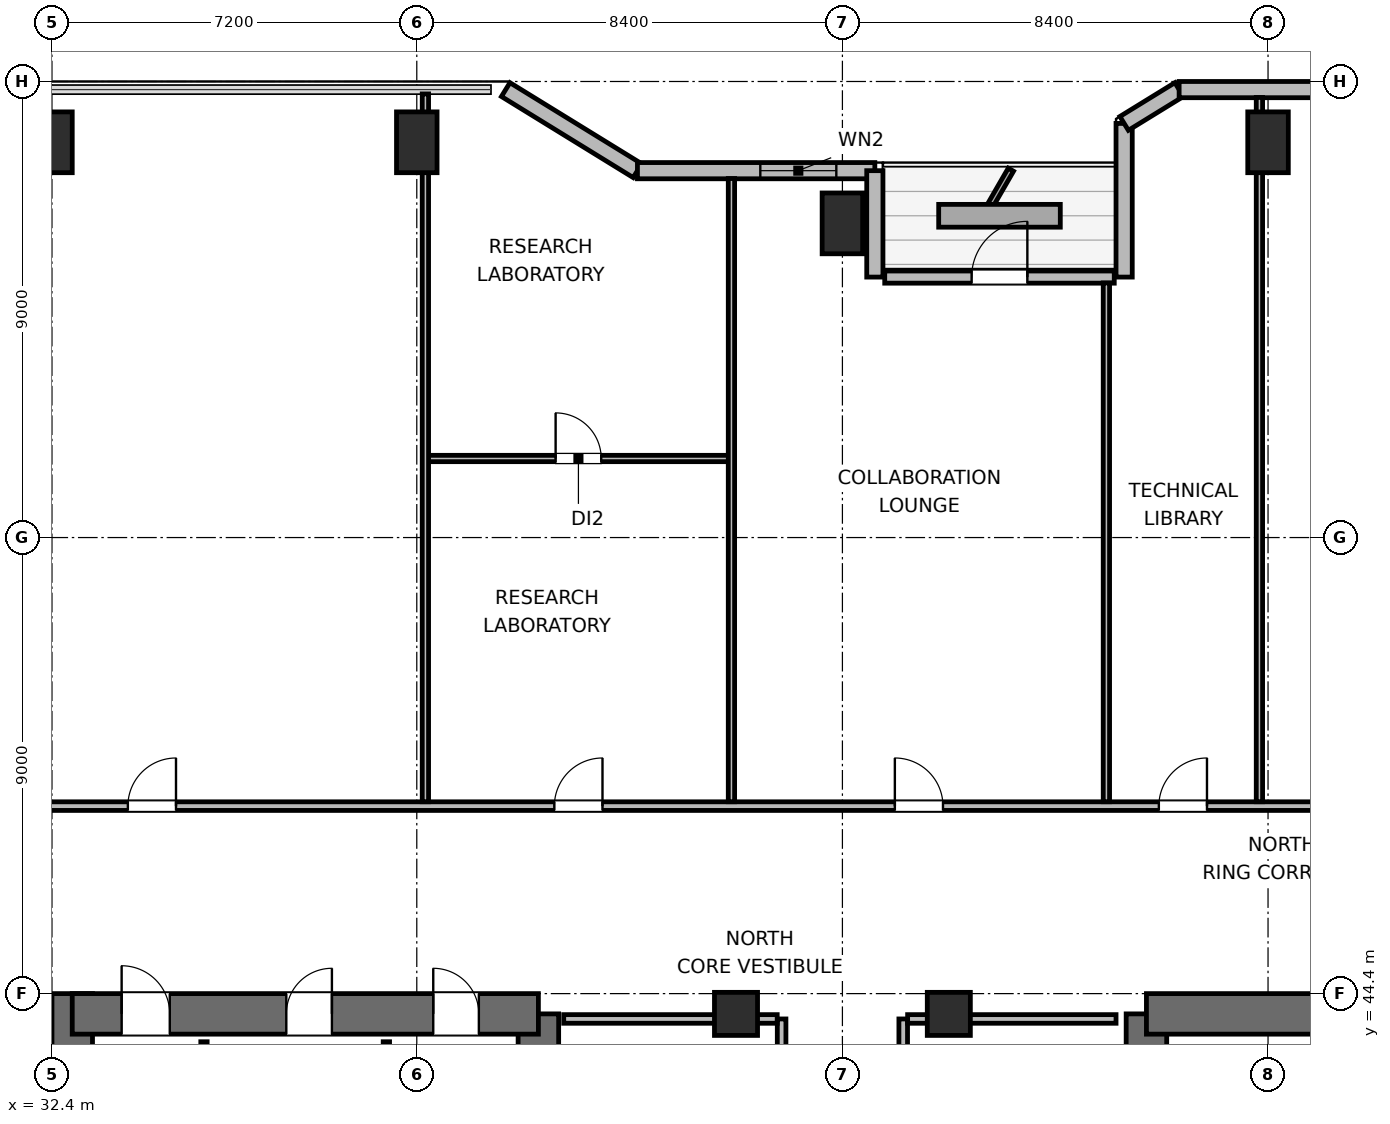
"""IFC4 building model, lengths in metres.
Left out: names, types, materials, properties, quantities, classifications, styles, units other than length and angle.
Written with IfcOpenShell. Run it as: python <this file> out.ifc"""

import sys

from ifc_helpers import new_model, si_unit, direction, frame, frame_2d, origin, origin_2d, place, context, subcontext, project, spatial, rectangle, extrude, element, fill, save


model = new_model("IFC4")
c1 = context("Model", 3, precision=1e-05, world=origin(), true_north=direction((0.0, 1.0)))
c2 = subcontext(c1, "Body", "Model", "MODEL_VIEW")
j1 = project(units=[si_unit("LENGTHUNIT", "METRE"), si_unit("PLANEANGLEUNIT", "RADIAN")], contexts=[c1])
p1 = place(None, origin())
s1 = spatial("IfcSite", under=j1, at=p1, CompositionType="ELEMENT")
p2 = place(p1, origin())
s2 = spatial("IfcBuilding", under=s1, at=p2, CompositionType="ELEMENT")
p3 = place(p2, frame((0.0, 0.0, 105.3)))
s3 = spatial("IfcBuildingStorey", under=s2, at=p3, CompositionType="ELEMENT", Elevation=105.3)
p4 = place(p3, frame((32.8, 27.6, 0.0), z_axis=(0.0, 0.0, 1.0), x_axis=(0.0, 1.0, 0.0)))
e1 = element("IfcWall", 1, at=p4, inside=s3, PredefinedType="SHEAR", context=c2, shape_type="SweptSolid", body=[
    extrude(rectangle(XDim=16.8, YDim=0.8, at=frame_2d((8.4, 0.0))), origin(), (0.0, 0.0, 1.0), 3.9),
])
p5 = place(p3, frame((42.0, 37.8, 0.0), z_axis=(0.0, 0.0, 1.0), x_axis=(0.0, 1.0, 0.0)))
e2 = element("IfcWall", 2, at=p5, inside=s3, PredefinedType="SHEAR", context=c2, shape_type="SweptSolid", body=[
    extrude(rectangle(XDim=6.2, YDim=0.8, at=frame_2d((3.1, 0.0))), origin(), (0.0, 0.0, 1.0), 3.9),
])
p6 = place(p3, frame((32.8, 44.0, 0.0), z_axis=(0.0, 0.0, 1.0), x_axis=(1.0, 0.0, 0.0)))
e3 = element("IfcWall", 3, at=p6, inside=s3, PredefinedType="SHEAR", context=c2, shape_type="SweptSolid", body=[
    extrude(rectangle(XDim=9.2, YDim=0.8, at=frame_2d((4.6, 0.0))), origin(), (0.0, 0.0, 1.0), 3.9),
])
p7 = place(p6, frame((0.975, 0.0, 0.0)))
e4 = element("IfcOpeningElement", 4, at=p7, cuts=e3, PredefinedType="OPENING", context=c2, shape_type="SweptSolid", body=[
    extrude(rectangle(XDim=0.95, YDim=2.04, at=frame_2d((0.475, 1.02))), frame((0.0, 0.41, 0.0), z_axis=(0.0, -1.0, 0.0), x_axis=(1.0, 0.0, 0.0)), (0.0, 0.0, 1.0), 0.82),
])
p8 = place(p6, frame((4.225, 0.0, 0.0)))
e5 = element("IfcOpeningElement", 5, at=p8, cuts=e3, PredefinedType="OPENING", context=c2, shape_type="SweptSolid", body=[
    extrude(rectangle(XDim=0.9, YDim=2.02, at=frame_2d((0.45, 1.01))), frame((0.0, 0.41, 0.0), z_axis=(0.0, -1.0, 0.0), x_axis=(1.0, 0.0, 0.0)), (0.0, 0.0, 1.0), 0.82),
])
p9 = place(p6, frame((7.125, 0.0, 0.0)))
e6 = element("IfcOpeningElement", 6, at=p9, cuts=e3, PredefinedType="OPENING", context=c2, shape_type="SweptSolid", body=[
    extrude(rectangle(XDim=0.9, YDim=2.02, at=frame_2d((0.45, 1.01))), frame((0.0, 0.41, 0.0), z_axis=(0.0, -1.0, 0.0), x_axis=(1.0, 0.0, 0.0)), (0.0, 0.0, 1.0), 0.82),
])
p10 = place(p3, frame((54.0, 38.0, 0.0), z_axis=(0.0, 0.0, 1.0), x_axis=(0.0, 1.0, 0.0)))
e7 = element("IfcWall", 7, at=p10, inside=s3, PredefinedType="SHEAR", context=c2, shape_type="SweptSolid", body=[
    extrude(rectangle(XDim=6.0, YDim=0.8, at=frame_2d((3.0, 0.0))), origin(), (0.0, 0.0, 1.0), 3.9),
])
p11 = place(p3, frame((54.0, 44.0, 0.0), z_axis=(0.0, 0.0, 1.0), x_axis=(1.0, 0.0, 0.0)))
e8 = element("IfcWall", 8, at=p11, inside=s3, PredefinedType="SHEAR", context=c2, shape_type="SweptSolid", body=[
    extrude(rectangle(XDim=9.2, YDim=0.8, at=frame_2d((4.6, 0.0))), origin(), (0.0, 0.0, 1.0), 3.9),
])
for number, where, z_axis, x_axis in (
    (9, (32.4, 61.2, 0.0), (0.0, 0.0, 1.0), (1.0, 0.0, 0.0)),
    (10, (39.6, 61.2, 0.0), (0.0, 0.0, 1.0), (1.0, 0.0, 0.0)),
    (11, (48.0, 59.6, 0.0), (0.0, 0.0, 1.0), (1.0, 0.0, 0.0)),
    (12, (56.4, 61.2, 0.0), (0.0, 0.0, 1.0), (1.0, 0.0, 0.0)),
):
    element("IfcColumn", number, at=place(p3, frame(where, z_axis=z_axis, x_axis=x_axis)), inside=s3, PredefinedType="COLUMN", context=c2, shape_type="SweptSolid", body=[
        extrude(rectangle(XDim=0.8, YDim=1.2, at=origin_2d()), origin(), (0.0, 0.0, 1.0), 3.9),
    ])
for number, where, z_axis, x_axis in (
    (13, (45.9, 44.0, 0.0), (0.0, 0.0, 1.0), (1.0, 0.0, 0.0)),
    (14, (50.1, 44.0, 0.0), (0.0, 0.0, 1.0), (1.0, 0.0, 0.0)),
):
    element("IfcColumn", number, at=place(p3, frame(where, z_axis=z_axis, x_axis=x_axis)), inside=s3, PredefinedType="COLUMN", context=c2, shape_type="SweptSolid", body=[
        extrude(rectangle(XDim=0.85, YDim=0.85, at=origin_2d()), origin(), (0.0, 0.0, 1.0), 3.9),
    ])
p12 = place(p3, frame((41.355, 62.24, 0.0), z_axis=(0.0, 0.0, 1.0), x_axis=(0.851630857047, -0.524142044989, 0.0)))
e15 = element("IfcWall", 15, at=p12, inside=s3, PredefinedType="SOLIDWALL", context=c2, shape_type="SweptSolid", body=[
    extrude(rectangle(XDim=3.053, YDim=0.32, at=frame_2d((1.526, 0.0))), origin(), (0.0, 0.0, 1.0), 2.875),
])
p13 = place(p3, frame((43.955, 60.64, 0.0), z_axis=(0.0, 0.0, 1.0), x_axis=(1.0, 0.0, 0.0)))
e16 = element("IfcWall", 16, at=p13, inside=s3, PredefinedType="SOLIDWALL", context=c2, shape_type="SweptSolid", body=[
    extrude(rectangle(XDim=4.685, YDim=0.32, at=frame_2d((2.343, 0.0))), origin(), (0.0, 0.0, 1.0), 2.875),
])
p14 = place(p13, frame((2.425, 0.0, 0.85)))
e17 = element("IfcOpeningElement", 17, at=p14, cuts=e16, PredefinedType="OPENING", context=c2, shape_type="SweptSolid", body=[
    extrude(rectangle(XDim=1.5, YDim=1.1, at=frame_2d((0.75, 0.55))), frame((0.0, 0.17, 0.0), z_axis=(0.0, -1.0, 0.0), x_axis=(1.0, 0.0, 0.0)), (0.0, 0.0, 1.0), 0.34),
])
p15 = place(p3, frame((48.64, 60.64, 0.0), z_axis=(0.0, 0.0, 1.0), x_axis=(0.0, -1.0, 0.0)))
e18 = element("IfcWall", 18, at=p15, inside=s3, PredefinedType="SOLIDWALL", context=c2, shape_type="SweptSolid", body=[
    extrude(rectangle(XDim=2.1, YDim=0.32, at=frame_2d((1.05, 0.0))), origin(), (0.0, 0.0, 1.0), 2.875),
])
p16 = place(p3, frame((48.835, 58.54, 0.0), z_axis=(0.0, 0.0, 1.0), x_axis=(1.0, 0.0, 0.0)))
e19 = element("IfcWall", 19, at=p16, inside=s3, PredefinedType="SOLIDWALL", context=c2, shape_type="SweptSolid", body=[
    extrude(rectangle(XDim=4.53, YDim=0.24, at=frame_2d((2.265, 0.0))), origin(), (0.0, 0.0, 1.0), 3.64),
])
p17 = place(p16, frame((1.715, 0.0, 0.0)))
e20 = element("IfcOpeningElement", 20, at=p17, cuts=e19, PredefinedType="OPENING", context=c2, shape_type="SweptSolid", body=[
    extrude(rectangle(XDim=1.1, YDim=2.04, at=frame_2d((0.55, 1.02))), frame((0.0, 0.13, 0.0), z_axis=(0.0, -1.0, 0.0), x_axis=(1.0, 0.0, 0.0)), (0.0, 0.0, 1.0), 0.26),
])
p18 = place(p3, frame((53.56, 58.54, 0.0), z_axis=(0.0, 0.0, 1.0), x_axis=(0.0, 1.0, 0.0)))
e21 = element("IfcWall", 21, at=p18, inside=s3, PredefinedType="SOLIDWALL", context=c2, shape_type="SweptSolid", body=[
    extrude(rectangle(XDim=3.032, YDim=0.32, at=frame_2d((1.516, 0.0))), origin(), (0.0, 0.0, 1.0), 2.875),
])
p19 = place(p3, frame((53.56, 61.573, 0.0), z_axis=(0.0, 0.0, 1.0), x_axis=(0.851776724646, 0.523904964045, 0.0)))
e22 = element("IfcWall", 22, at=p19, inside=s3, PredefinedType="SOLIDWALL", context=c2, shape_type="SweptSolid", body=[
    extrude(rectangle(XDim=1.274, YDim=0.32, at=frame_2d((0.637, 0.0))), origin(), (0.0, 0.0, 1.0), 3.64),
])
p20 = place(p3, frame((54.645, 62.24, 0.0), z_axis=(0.0, 0.0, 1.0), x_axis=(1.0, 0.0, 0.0)))
e23 = element("IfcWall", 23, at=p20, inside=s3, PredefinedType="SOLIDWALL", context=c2, shape_type="SweptSolid", body=[
    extrude(rectangle(XDim=10.734, YDim=0.32, at=frame_2d((5.367, 0.0))), origin(), (0.0, 0.0, 1.0), 3.64),
])
for number, where, z_axis, x_axis in (
    (24, (35.4, 41.095, 0.0), (0.0, 0.0, 1.0), (0.0, 1.0, 0.0)),
    (25, (39.0, 41.095, 0.0), (0.0, 0.0, 1.0), (0.0, 1.0, 0.0)),
):
    element("IfcWall", number, at=place(p3, frame(where, z_axis=z_axis, x_axis=x_axis)), inside=s3, PredefinedType="PARTITIONING", context=c2, shape_type="SweptSolid", body=[
        extrude(rectangle(XDim=2.355, YDim=0.125, at=frame_2d((1.177, 0.0))), origin(), (0.0, 0.0, 1.0), 3.64),
    ])
p21 = place(p3, frame((46.8, 37.9, 0.0), z_axis=(0.0, 0.0, 1.0), x_axis=(0.0, 1.0, 0.0)))
e26 = element("IfcWall", 26, at=p21, inside=s3, PredefinedType="PARTITIONING", context=c2, shape_type="SweptSolid", body=[
    extrude(rectangle(XDim=6.0, YDim=0.17, at=frame_2d((3.0, 0.0))), origin(), (0.0, 0.0, 1.0), 3.64),
])
p22 = place(p21, frame((0.54, 0.0, 0.0)))
e27 = element("IfcOpeningElement", 27, at=p22, cuts=e26, PredefinedType="OPENING", context=c2, shape_type="SweptSolid", body=[
    extrude(rectangle(XDim=0.9, YDim=2.02, at=frame_2d((0.45, 1.01))), frame((0.0, 0.095, 0.0), z_axis=(0.0, -1.0, 0.0), x_axis=(1.0, 0.0, 0.0)), (0.0, 0.0, 1.0), 0.19),
])
p23 = place(p21, frame((2.55, 0.0, 0.0)))
e28 = element("IfcOpeningElement", 28, at=p23, cuts=e26, PredefinedType="OPENING", context=c2, shape_type="SweptSolid", body=[
    extrude(rectangle(XDim=0.9, YDim=2.02, at=frame_2d((0.45, 1.01))), frame((0.0, 0.095, 0.0), z_axis=(0.0, -1.0, 0.0), x_axis=(1.0, 0.0, 0.0)), (0.0, 0.0, 1.0), 0.19),
])
p24 = place(p21, frame((4.56, 0.0, 0.0)))
e29 = element("IfcOpeningElement", 29, at=p24, cuts=e26, PredefinedType="OPENING", context=c2, shape_type="SweptSolid", body=[
    extrude(rectangle(XDim=0.9, YDim=2.02, at=frame_2d((0.45, 1.01))), frame((0.0, 0.095, 0.0), z_axis=(0.0, -1.0, 0.0), x_axis=(1.0, 0.0, 0.0)), (0.0, 0.0, 1.0), 0.19),
])
p25 = place(p3, frame((42.5, 43.9, 0.0), z_axis=(0.0, 0.0, 1.0), x_axis=(1.0, 0.0, 0.0)))
e30 = element("IfcWall", 30, at=p25, inside=s3, PredefinedType="PARTITIONING", context=c2, shape_type="SweptSolid", body=[
    extrude(rectangle(XDim=4.213, YDim=0.17, at=frame_2d((2.106, 0.0))), origin(), (0.0, 0.0, 1.0), 2.525),
])
p26 = place(p3, frame((49.2, 37.9, 0.0), z_axis=(0.0, 0.0, 1.0), x_axis=(0.0, 1.0, 0.0)))
e31 = element("IfcWall", 31, at=p26, inside=s3, PredefinedType="PARTITIONING", context=c2, shape_type="SweptSolid", body=[
    extrude(rectangle(XDim=6.0, YDim=0.17, at=frame_2d((3.0, 0.0))), origin(), (0.0, 0.0, 1.0), 3.64),
])
p27 = place(p26, frame((0.69, 0.0, 0.0)))
e32 = element("IfcOpeningElement", 32, at=p27, cuts=e31, PredefinedType="OPENING", context=c2, shape_type="SweptSolid", body=[
    extrude(rectangle(XDim=0.9, YDim=2.02, at=frame_2d((0.45, 1.01))), frame((0.0, 0.095, 0.0), z_axis=(0.0, -1.0, 0.0), x_axis=(1.0, 0.0, 0.0)), (0.0, 0.0, 1.0), 0.19),
])
p28 = place(p26, frame((3.69, 0.0, 0.0)))
e33 = element("IfcOpeningElement", 33, at=p28, cuts=e31, PredefinedType="OPENING", context=c2, shape_type="SweptSolid", body=[
    extrude(rectangle(XDim=0.9, YDim=2.02, at=frame_2d((0.45, 1.01))), frame((0.0, 0.095, 0.0), z_axis=(0.0, -1.0, 0.0), x_axis=(1.0, 0.0, 0.0)), (0.0, 0.0, 1.0), 0.19),
])
p29 = place(p3, frame((49.287, 43.9, 0.0), z_axis=(0.0, 0.0, 1.0), x_axis=(1.0, 0.0, 0.0)))
e34 = element("IfcWall", 34, at=p29, inside=s3, PredefinedType="PARTITIONING", context=c2, shape_type="SweptSolid", body=[
    extrude(rectangle(XDim=4.113, YDim=0.17, at=frame_2d((2.056, 0.0))), origin(), (0.0, 0.0, 1.0), 2.525),
])
p30 = place(p3, frame((28.975, 48.1, 0.0), z_axis=(0.0, 0.0, 1.0), x_axis=(1.0, 0.0, 0.0)))
e35 = element("IfcWall", 35, at=p30, inside=s3, PredefinedType="PARTITIONING", context=c2, shape_type="SweptSolid", body=[
    extrude(rectangle(XDim=38.05, YDim=0.17, at=frame_2d((19.025, 0.0))), origin(), (0.0, 0.0, 1.0), 3.64),
])
p31 = place(p30, frame((4.923, 0.0, 0.0)))
e36 = element("IfcOpeningElement", 36, at=p31, cuts=e35, PredefinedType="OPENING", context=c2, shape_type="SweptSolid", body=[
    extrude(rectangle(XDim=0.95, YDim=2.04, at=frame_2d((0.475, 1.02))), frame((0.0, 0.095, 0.0), z_axis=(0.0, -1.0, 0.0), x_axis=(1.0, 0.0, 0.0)), (0.0, 0.0, 1.0), 0.19),
])
p32 = place(p30, frame((13.34, 0.0, 0.0)))
e37 = element("IfcOpeningElement", 37, at=p32, cuts=e35, PredefinedType="OPENING", context=c2, shape_type="SweptSolid", body=[
    extrude(rectangle(XDim=0.95, YDim=2.04, at=frame_2d((0.475, 1.02))), frame((0.0, 0.095, 0.0), z_axis=(0.0, -1.0, 0.0), x_axis=(1.0, 0.0, 0.0)), (0.0, 0.0, 1.0), 0.19),
])
p33 = place(p30, frame((20.06, 0.0, 0.0)))
e38 = element("IfcOpeningElement", 38, at=p33, cuts=e35, PredefinedType="OPENING", context=c2, shape_type="SweptSolid", body=[
    extrude(rectangle(XDim=0.95, YDim=2.04, at=frame_2d((0.475, 1.02))), frame((0.0, 0.095, 0.0), z_axis=(0.0, -1.0, 0.0), x_axis=(1.0, 0.0, 0.0)), (0.0, 0.0, 1.0), 0.19),
])
p34 = place(p30, frame((25.27, 0.0, 0.0)))
e39 = element("IfcOpeningElement", 39, at=p34, cuts=e35, PredefinedType="OPENING", context=c2, shape_type="SweptSolid", body=[
    extrude(rectangle(XDim=0.95, YDim=2.04, at=frame_2d((0.475, 1.02))), frame((0.0, 0.095, 0.0), z_axis=(0.0, -1.0, 0.0), x_axis=(1.0, 0.0, 0.0)), (0.0, 0.0, 1.0), 0.19),
])
p35 = place(p30, frame((32.178, 0.0, 0.0)))
e40 = element("IfcOpeningElement", 40, at=p35, cuts=e35, PredefinedType="OPENING", context=c2, shape_type="SweptSolid", body=[
    extrude(rectangle(XDim=0.95, YDim=2.04, at=frame_2d((0.475, 1.02))), frame((0.0, 0.095, 0.0), z_axis=(0.0, -1.0, 0.0), x_axis=(1.0, 0.0, 0.0)), (0.0, 0.0, 1.0), 0.19),
])
p36 = place(p3, frame((39.77, 54.96, 0.0), z_axis=(0.0, 0.0, 1.0), x_axis=(1.0, 0.0, 0.0)))
e41 = element("IfcWall", 41, at=p36, inside=s3, PredefinedType="PARTITIONING", context=c2, shape_type="SweptSolid", body=[
    extrude(rectangle(XDim=6.04, YDim=0.125, at=frame_2d((3.02, 0.0))), origin(), (0.0, 0.0, 1.0), 3.64),
])
p37 = place(p36, frame((2.57, 0.0, 0.0)))
e42 = element("IfcOpeningElement", 42, at=p37, cuts=e41, PredefinedType="OPENING", context=c2, shape_type="SweptSolid", body=[
    extrude(rectangle(XDim=0.9, YDim=2.02, at=frame_2d((0.45, 1.01))), frame((0.0, 0.073, 0.0), z_axis=(0.0, -1.0, 0.0), x_axis=(1.0, 0.0, 0.0)), (0.0, 0.0, 1.0), 0.145),
])
p38 = place(p3, frame((39.77, 48.187, 0.0), z_axis=(0.0, 0.0, 1.0), x_axis=(0.0, 1.0, 0.0)))
e43 = element("IfcWall", 43, at=p38, inside=s3, PredefinedType="PARTITIONING", context=c2, shape_type="SweptSolid", body=[
    extrude(rectangle(XDim=13.968, YDim=0.125, at=frame_2d((6.984, 0.0))), origin(), (0.0, 0.0, 1.0), 3.003),
])
p39 = place(p3, frame((45.81, 48.187, 0.0), z_axis=(0.0, 0.0, 1.0), x_axis=(0.0, 1.0, 0.0)))
e44 = element("IfcWall", 44, at=p39, inside=s3, PredefinedType="PARTITIONING", context=c2, shape_type="SweptSolid", body=[
    extrude(rectangle(XDim=12.298, YDim=0.125, at=frame_2d((6.149, 0.0))), origin(), (0.0, 0.0, 1.0), 3.64),
])
p40 = place(p3, frame((53.21, 48.187, 0.0), z_axis=(0.0, 0.0, 1.0), x_axis=(0.0, 1.0, 0.0)))
e45 = element("IfcWall", 45, at=p40, inside=s3, PredefinedType="PARTITIONING", context=c2, shape_type="SweptSolid", body=[
    extrude(rectangle(XDim=10.238, YDim=0.125, at=frame_2d((5.119, 0.0))), origin(), (0.0, 0.0, 1.0), 3.003),
])
p41 = place(p3, frame((56.23, 48.187, 0.0), z_axis=(0.0, 0.0, 1.0), x_axis=(0.0, 1.0, 0.0)))
e46 = element("IfcWall", 46, at=p41, inside=s3, PredefinedType="PARTITIONING", context=c2, shape_type="SweptSolid", body=[
    extrude(rectangle(XDim=13.898, YDim=0.125, at=frame_2d((6.949, 0.0))), origin(), (0.0, 0.0, 1.0), 3.003),
])
p42 = place(p14, origin())
e47 = element("IfcWindow", 47, at=p42, inside=s3, PartitioningType="SINGLE_PANEL", PredefinedType="WINDOW", context=c2, shape_type="SweptSolid", body=[
    extrude(rectangle(XDim=1.5, YDim=1.1, at=frame_2d((0.75, 0.55))), frame((0.0, 0.03, 0.0), z_axis=(0.0, -1.0, 0.0), x_axis=(1.0, 0.0, 0.0)), (0.0, 0.0, 1.0), 0.06),
])
fill(e17, e47)
p43 = place(p17, origin())
e48 = element("IfcDoor", 48, at=p43, inside=s3, OperationType="SINGLE_SWING_RIGHT", PredefinedType="DOOR", context=c2, shape_type="SweptSolid", body=[
    extrude(rectangle(XDim=1.1, YDim=2.04, at=frame_2d((0.55, 1.02))), frame((0.0, 0.025, 0.0), z_axis=(0.0, -1.0, 0.0), x_axis=(1.0, 0.0, 0.0)), (0.0, 0.0, 1.0), 0.05),
])
fill(e20, e48)
p44 = place(p7, origin())
e49 = element("IfcDoor", 49, at=p44, inside=s3, OperationType="SINGLE_SWING_LEFT", PredefinedType="DOOR", context=c2, shape_type="SweptSolid", body=[
    extrude(rectangle(XDim=0.95, YDim=2.04, at=frame_2d((0.475, 1.02))), frame((0.0, 0.025, 0.0), z_axis=(0.0, -1.0, 0.0), x_axis=(1.0, 0.0, 0.0)), (0.0, 0.0, 1.0), 0.05),
])
fill(e4, e49)
p45 = place(p8, origin())
e50 = element("IfcDoor", 50, at=p45, inside=s3, OperationType="SINGLE_SWING_RIGHT", PredefinedType="DOOR", context=c2, shape_type="SweptSolid", body=[
    extrude(rectangle(XDim=0.9, YDim=2.02, at=frame_2d((0.45, 1.01))), frame((0.0, 0.025, 0.0), z_axis=(0.0, -1.0, 0.0), x_axis=(1.0, 0.0, 0.0)), (0.0, 0.0, 1.0), 0.05),
])
fill(e5, e50)
p46 = place(p9, origin())
e51 = element("IfcDoor", 51, at=p46, inside=s3, OperationType="SINGLE_SWING_LEFT", PredefinedType="DOOR", context=c2, shape_type="SweptSolid", body=[
    extrude(rectangle(XDim=0.9, YDim=2.02, at=frame_2d((0.45, 1.01))), frame((0.0, 0.025, 0.0), z_axis=(0.0, -1.0, 0.0), x_axis=(1.0, 0.0, 0.0)), (0.0, 0.0, 1.0), 0.05),
])
fill(e6, e51)
p47 = place(p31, origin())
e52 = element("IfcDoor", 52, at=p47, inside=s3, OperationType="SINGLE_SWING_RIGHT", PredefinedType="DOOR", context=c2, shape_type="SweptSolid", body=[
    extrude(rectangle(XDim=0.95, YDim=2.04, at=frame_2d((0.475, 1.02))), frame((0.0, 0.025, 0.0), z_axis=(0.0, -1.0, 0.0), x_axis=(1.0, 0.0, 0.0)), (0.0, 0.0, 1.0), 0.05),
])
fill(e36, e52)
p48 = place(p37, origin())
e53 = element("IfcDoor", 53, at=p48, inside=s3, OperationType="SINGLE_SWING_LEFT", PredefinedType="DOOR", context=c2, shape_type="SweptSolid", body=[
    extrude(rectangle(XDim=0.9, YDim=2.02, at=frame_2d((0.45, 1.01))), frame((0.0, 0.025, 0.0), z_axis=(0.0, -1.0, 0.0), x_axis=(1.0, 0.0, 0.0)), (0.0, 0.0, 1.0), 0.05),
])
fill(e42, e53)
p49 = place(p32, origin())
e54 = element("IfcDoor", 54, at=p49, inside=s3, OperationType="SINGLE_SWING_RIGHT", PredefinedType="DOOR", context=c2, shape_type="SweptSolid", body=[
    extrude(rectangle(XDim=0.95, YDim=2.04, at=frame_2d((0.475, 1.02))), frame((0.0, 0.025, 0.0), z_axis=(0.0, -1.0, 0.0), x_axis=(1.0, 0.0, 0.0)), (0.0, 0.0, 1.0), 0.05),
])
fill(e37, e54)
p50 = place(p33, origin())
e55 = element("IfcDoor", 55, at=p50, inside=s3, OperationType="SINGLE_SWING_LEFT", PredefinedType="DOOR", context=c2, shape_type="SweptSolid", body=[
    extrude(rectangle(XDim=0.95, YDim=2.04, at=frame_2d((0.475, 1.02))), frame((0.0, 0.025, 0.0), z_axis=(0.0, -1.0, 0.0), x_axis=(1.0, 0.0, 0.0)), (0.0, 0.0, 1.0), 0.05),
])
fill(e38, e55)
p51 = place(p34, origin())
e56 = element("IfcDoor", 56, at=p51, inside=s3, OperationType="SINGLE_SWING_RIGHT", PredefinedType="DOOR", context=c2, shape_type="SweptSolid", body=[
    extrude(rectangle(XDim=0.95, YDim=2.04, at=frame_2d((0.475, 1.02))), frame((0.0, 0.025, 0.0), z_axis=(0.0, -1.0, 0.0), x_axis=(1.0, 0.0, 0.0)), (0.0, 0.0, 1.0), 0.05),
])
fill(e39, e56)
save(model, sys.argv[1])
